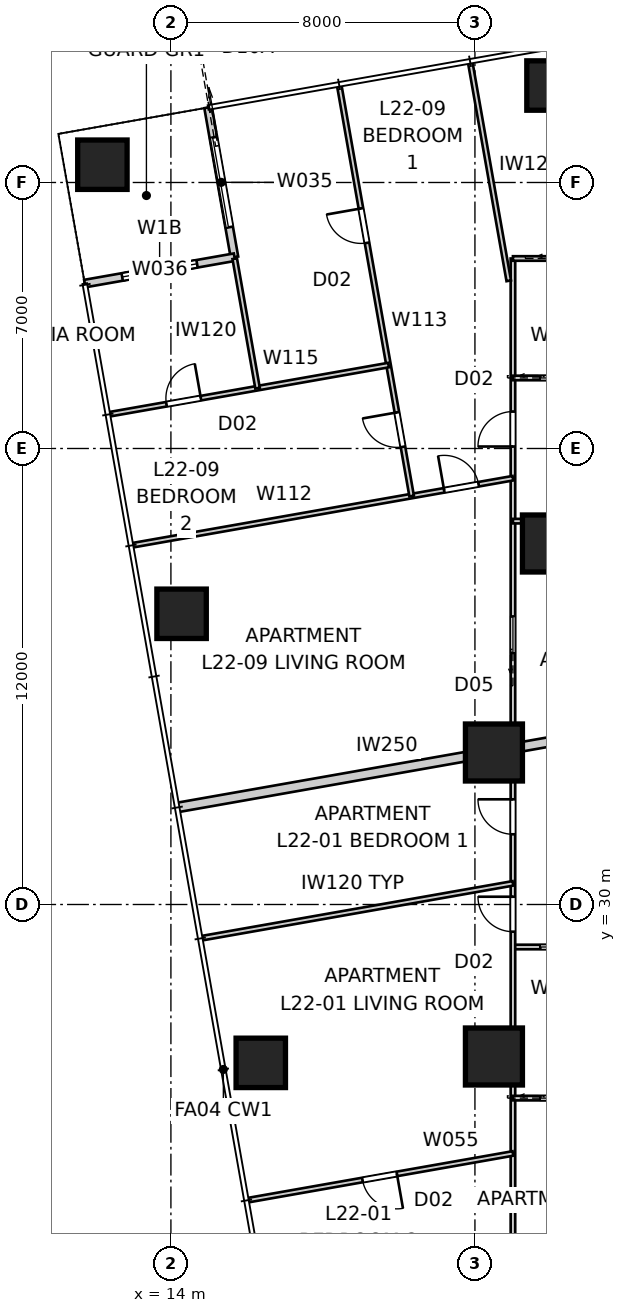
"""IFC4 building model, lengths in metres.
Left out: names, types, materials, properties, quantities, classifications, styles, units other than length and angle.
Written with IfcOpenShell. Run it as: python <this file> out.ifc"""

import sys

from ifc_helpers import new_model, si_unit, direction, frame, frame_2d, origin, origin_2d, place, context, subcontext, project, spatial, rectangle, extrude, element, fill, save


model = new_model("IFC4")
c1 = context("Model", 3, precision=1e-05, world=origin(), true_north=direction((0.0, 1.0)))
c2 = subcontext(c1, "Body", "Model", "MODEL_VIEW")
j1 = project(units=[si_unit("LENGTHUNIT", "METRE"), si_unit("PLANEANGLEUNIT", "RADIAN")], contexts=[c1])
p1 = place(None, origin())
s1 = spatial("IfcSite", under=j1, at=p1, CompositionType="ELEMENT")
p2 = place(p1, origin())
s2 = spatial("IfcBuilding", under=s1, at=p2, CompositionType="ELEMENT")
p3 = place(p2, frame((0.0, 0.0, 82.8)))
s3 = spatial("IfcBuildingStorey", under=s2, at=p3, CompositionType="ELEMENT", Elevation=82.8)
for number, where, z_axis, x_axis in (
    (1, (24.015, 51.552, 0.0), (0.0, 0.0, 1.0), (1.0, 0.0, 0.0)),
    (2, (12.197, 49.468, 0.0), (0.0, 0.0, 1.0), (1.0, 0.0, 0.0)),
    (3, (14.281, 37.65, 0.0), (0.0, 0.0, 1.0), (1.0, 0.0, 0.0)),
    (4, (16.365, 25.833, 0.0), (0.0, 0.0, 1.0), (1.0, 0.0, 0.0)),
):
    element("IfcColumn", number, at=place(p3, frame(where, z_axis=z_axis, x_axis=x_axis)), inside=s3, PredefinedType="COLUMN", context=c2, shape_type="SweptSolid", body=[
        extrude(rectangle(XDim=1.3, YDim=1.3, at=origin_2d()), origin(), (0.0, 0.0, 1.0), 3.4),
    ])
for number, where, z_axis, x_axis in (
    (5, (24.0, 39.5, 0.0), (0.0, 0.0, 1.0), (1.0, 0.0, 0.0)),
    (6, (22.5, 34.0, 0.0), (0.0, 0.0, 1.0), (1.0, 0.0, 0.0)),
    (7, (22.5, 26.0, 0.0), (0.0, 0.0, 1.0), (1.0, 0.0, 0.0)),
):
    element("IfcColumn", number, at=place(p3, frame(where, z_axis=z_axis, x_axis=x_axis)), inside=s3, PredefinedType="COLUMN", context=c2, shape_type="SweptSolid", body=[
        extrude(rectangle(XDim=1.5, YDim=1.5, at=origin_2d()), origin(), (0.0, 0.0, 1.0), 3.4),
    ])
p4 = place(p3, frame((14.978, 50.974, 0.0), z_axis=(0.0, 0.0, 1.0), x_axis=(0.173646056486, -0.984808127031, 0.0)))
e8 = element("IfcWall", 8, at=p4, inside=s3, PredefinedType="SOLIDWALL", context=c2, shape_type="SweptSolid", body=[
    extrude(rectangle(XDim=4.0, YDim=0.2, at=frame_2d((2.0, 0.0))), origin(), (0.0, 0.0, 1.0), 3.25),
])
p5 = place(p4, frame((0.8, 0.0, 0.0)))
e9 = element("IfcOpeningElement", 9, at=p5, cuts=e8, PredefinedType="OPENING", context=c2, shape_type="SweptSolid", body=[
    extrude(rectangle(XDim=2.4, YDim=2.1, at=frame_2d((1.2, 1.05))), frame((0.0, 0.11, 0.0), z_axis=(0.0, -1.0, 0.0), x_axis=(1.0, 0.0, 0.0)), (0.0, 0.0, 1.0), 0.22),
])
p6 = place(p3, frame((15.672, 47.034, 0.0), z_axis=(0.0, 0.0, 1.0), x_axis=(-0.984808127031, -0.173646056486, 0.0)))
e10 = element("IfcWall", 10, at=p6, inside=s3, PredefinedType="SOLIDWALL", context=c2, shape_type="SweptSolid", body=[
    extrude(rectangle(XDim=4.0, YDim=0.2, at=frame_2d((2.0, 0.0))), origin(), (0.0, 0.0, 1.0), 3.25),
])
p7 = place(p6, frame((1.0, 0.0, 0.45)))
e11 = element("IfcOpeningElement", 11, at=p7, cuts=e10, PredefinedType="OPENING", context=c2, shape_type="SweptSolid", body=[
    extrude(rectangle(XDim=2.0, YDim=1.8, at=frame_2d((1.0, 0.9))), frame((0.0, 0.11, 0.0), z_axis=(0.0, -1.0, 0.0), x_axis=(1.0, 0.0, 0.0)), (0.0, 0.0, 1.0), 0.22),
])
p8 = place(p3, frame((14.164, 32.552, 0.0), z_axis=(0.0, 0.0, 1.0), x_axis=(0.98481000304, 0.173635416642, 0.0)))
e12 = element("IfcWall", 12, at=p8, inside=s3, PredefinedType="PARTITIONING", context=c2, shape_type="SweptSolid", body=[
    extrude(rectangle(XDim=11.427, YDim=0.25, at=frame_2d((5.713, 0.0))), origin(), (0.0, 0.0, 1.0), 3.25),
])
p9 = place(p3, frame((25.4, 28.882, 0.0), z_axis=(0.0, 0.0, 1.0), x_axis=(-1.0, 0.0, 0.0)))
e13 = element("IfcWall", 13, at=p9, inside=s3, PredefinedType="PARTITIONING", context=c2, shape_type="SweptSolid", body=[
    extrude(rectangle(XDim=2.4, YDim=0.12, at=frame_2d((1.2, 0.0))), origin(), (0.0, 0.0, 1.0), 3.25),
])
p10 = place(p9, frame((0.72, 0.0, 0.0)))
e14 = element("IfcOpeningElement", 14, at=p10, cuts=e13, PredefinedType="OPENING", context=c2, shape_type="SweptSolid", body=[
    extrude(rectangle(XDim=0.96, YDim=2.1, at=frame_2d((0.48, 1.05))), frame((0.0, 0.07, 0.0), z_axis=(0.0, -1.0, 0.0), x_axis=(1.0, 0.0, 0.0)), (0.0, 0.0, 1.0), 0.14),
])
p11 = place(p3, frame((23.0, 13.0, 0.0), z_axis=(0.0, 0.0, 1.0), x_axis=(0.0, 1.0, 0.0)))
e15 = element("IfcWall", 15, at=p11, inside=s3, PredefinedType="PARTITIONING", context=c2, shape_type="SweptSolid", body=[
    extrude(rectangle(XDim=34.0, YDim=0.12, at=frame_2d((17.0, 0.0))), origin(), (0.0, 0.0, 1.0), 2.55),
])
p12 = place(p11, frame((18.848, 0.0, 0.0)))
e16 = element("IfcOpeningElement", 16, at=p12, cuts=e15, PredefinedType="OPENING", context=c2, shape_type="SweptSolid", body=[
    extrude(rectangle(XDim=0.92, YDim=2.34, at=frame_2d((0.46, 1.17))), frame((0.0, 0.07, 0.0), z_axis=(0.0, -1.0, 0.0), x_axis=(1.0, 0.0, 0.0)), (0.0, 0.0, 1.0), 0.14),
])
p13 = place(p11, frame((16.284, 0.0, 0.0)))
e17 = element("IfcOpeningElement", 17, at=p13, cuts=e15, PredefinedType="OPENING", context=c2, shape_type="SweptSolid", body=[
    extrude(rectangle(XDim=0.92, YDim=2.34, at=frame_2d((0.46, 1.17))), frame((0.0, 0.07, 0.0), z_axis=(0.0, -1.0, 0.0), x_axis=(1.0, 0.0, 0.0)), (0.0, 0.0, 1.0), 0.14),
])
p14 = place(p11, frame((29.052, 0.0, 0.0)))
e18 = element("IfcOpeningElement", 18, at=p14, cuts=e15, PredefinedType="OPENING", context=c2, shape_type="SweptSolid", body=[
    extrude(rectangle(XDim=0.92, YDim=2.34, at=frame_2d((0.46, 1.17))), frame((0.0, 0.07, 0.0), z_axis=(0.0, -1.0, 0.0), x_axis=(1.0, 0.0, 0.0)), (0.0, 0.0, 1.0), 0.14),
])
p15 = place(p11, frame((1.196, 0.0, 0.0)))
e19 = element("IfcOpeningElement", 19, at=p15, cuts=e15, PredefinedType="OPENING", context=c2, shape_type="SweptSolid", body=[
    extrude(rectangle(XDim=0.92, YDim=2.34, at=frame_2d((0.46, 1.17))), frame((0.0, 0.07, 0.0), z_axis=(0.0, -1.0, 0.0), x_axis=(1.0, 0.0, 0.0)), (0.0, 0.0, 1.0), 0.14),
])
p16 = place(p11, frame((3.633, 0.0, 0.0)))
e20 = element("IfcOpeningElement", 20, at=p16, cuts=e15, PredefinedType="OPENING", context=c2, shape_type="SweptSolid", body=[
    extrude(rectangle(XDim=0.92, YDim=2.34, at=frame_2d((0.46, 1.17))), frame((0.0, 0.07, 0.0), z_axis=(0.0, -1.0, 0.0), x_axis=(1.0, 0.0, 0.0)), (0.0, 0.0, 1.0), 0.14),
])
p17 = place(p11, frame((23.619, 0.0, 0.0)))
e21 = element("IfcOpeningElement", 21, at=p17, cuts=e15, PredefinedType="OPENING", context=c2, shape_type="SweptSolid", body=[
    extrude(rectangle(XDim=0.96, YDim=2.1, at=frame_2d((0.48, 1.05))), frame((0.0, 0.07, 0.0), z_axis=(0.0, -1.0, 0.0), x_axis=(1.0, 0.0, 0.0)), (0.0, 0.0, 1.0), 0.14),
])
p18 = place(p3, frame((23.0, 24.905, 0.0), z_axis=(0.0, 0.0, 1.0), x_axis=(1.0, 0.0, 0.0)))
e22 = element("IfcWall", 22, at=p18, inside=s3, PredefinedType="PARTITIONING", context=c2, shape_type="SweptSolid", body=[
    extrude(rectangle(XDim=2.4, YDim=0.12, at=frame_2d((1.2, 0.0))), origin(), (0.0, 0.0, 1.0), 3.25),
])
p19 = place(p18, frame((0.72, 0.0, 0.0)))
e23 = element("IfcOpeningElement", 23, at=p19, cuts=e22, PredefinedType="OPENING", context=c2, shape_type="SweptSolid", body=[
    extrude(rectangle(XDim=0.96, YDim=2.1, at=frame_2d((0.48, 1.05))), frame((0.0, 0.07, 0.0), z_axis=(0.0, -1.0, 0.0), x_axis=(1.0, 0.0, 0.0)), (0.0, 0.0, 1.0), 0.14),
])
p20 = place(p3, frame((14.812, 29.113, 0.0), z_axis=(0.0, 0.0, 1.0), x_axis=(0.984807787824, 0.173647980238, 0.0)))
e24 = element("IfcWall", 24, at=p20, inside=s3, PredefinedType="PARTITIONING", context=c2, shape_type="SweptSolid", body=[
    extrude(rectangle(XDim=8.315, YDim=0.12, at=frame_2d((4.157, 0.0))), origin(), (0.0, 0.0, 1.0), 3.25),
])
p21 = place(p3, frame((23.0, 23.448, 0.0), z_axis=(0.0, 0.0, 1.0), x_axis=(-0.984809234282, -0.173639776761, 0.0)))
e25 = element("IfcWall", 25, at=p21, inside=s3, PredefinedType="PARTITIONING", context=c2, shape_type="SweptSolid", body=[
    extrude(rectangle(XDim=7.081, YDim=0.12, at=frame_2d((3.541, 0.0))), origin(), (0.0, 0.0, 1.0), 3.25),
])
p22 = place(p21, frame((3.1, 0.0, 0.0)))
e26 = element("IfcOpeningElement", 26, at=p22, cuts=e25, PredefinedType="OPENING", context=c2, shape_type="SweptSolid", body=[
    extrude(rectangle(XDim=0.92, YDim=2.34, at=frame_2d((0.46, 1.17))), frame((0.0, 0.07, 0.0), z_axis=(0.0, -1.0, 0.0), x_axis=(1.0, 0.0, 0.0)), (0.0, 0.0, 1.0), 0.14),
])
p23 = place(p3, frame((23.0, 47.0, 0.0), z_axis=(0.0, 0.0, 1.0), x_axis=(1.0, 0.0, 0.0)))
e27 = element("IfcWall", 27, at=p23, inside=s3, PredefinedType="PARTITIONING", context=c2, shape_type="SweptSolid", body=[
    extrude(rectangle(XDim=24.771, YDim=0.12, at=frame_2d((12.386, 0.0))), origin(), (0.0, 0.0, 1.0), 2.55),
])
p24 = place(p23, frame((21.825, 0.0, 0.0)))
e28 = element("IfcOpeningElement", 28, at=p24, cuts=e27, PredefinedType="OPENING", context=c2, shape_type="SweptSolid", body=[
    extrude(rectangle(XDim=0.92, YDim=2.34, at=frame_2d((0.46, 1.17))), frame((0.0, 0.07, 0.0), z_axis=(0.0, -1.0, 0.0), x_axis=(1.0, 0.0, 0.0)), (0.0, 0.0, 1.0), 0.14),
])
p25 = place(p23, frame((11.135, 0.0, 0.0)))
e29 = element("IfcOpeningElement", 29, at=p25, cuts=e27, PredefinedType="OPENING", context=c2, shape_type="SweptSolid", body=[
    extrude(rectangle(XDim=0.96, YDim=2.1, at=frame_2d((0.48, 1.05))), frame((0.0, 0.07, 0.0), z_axis=(0.0, -1.0, 0.0), x_axis=(1.0, 0.0, 0.0)), (0.0, 0.0, 1.0), 0.14),
])
p26 = place(p23, frame((1.19, 0.0, 0.0)))
e30 = element("IfcOpeningElement", 30, at=p26, cuts=e27, PredefinedType="OPENING", context=c2, shape_type="SweptSolid", body=[
    extrude(rectangle(XDim=0.96, YDim=2.1, at=frame_2d((0.48, 1.05))), frame((0.0, 0.07, 0.0), z_axis=(0.0, -1.0, 0.0), x_axis=(1.0, 0.0, 0.0)), (0.0, 0.0, 1.0), 0.14),
])
p27 = place(p23, frame((8.342, 0.0, 0.0)))
e31 = element("IfcOpeningElement", 31, at=p27, cuts=e27, PredefinedType="OPENING", context=c2, shape_type="SweptSolid", body=[
    extrude(rectangle(XDim=0.96, YDim=2.1, at=frame_2d((0.48, 1.05))), frame((0.0, 0.07, 0.0), z_axis=(0.0, -1.0, 0.0), x_axis=(1.0, 0.0, 0.0)), (0.0, 0.0, 1.0), 0.14),
])
p28 = place(p23, frame((4.663, 0.0, 0.0)))
e32 = element("IfcOpeningElement", 32, at=p28, cuts=e27, PredefinedType="OPENING", context=c2, shape_type="SweptSolid", body=[
    extrude(rectangle(XDim=0.96, YDim=2.1, at=frame_2d((0.48, 1.05))), frame((0.0, 0.07, 0.0), z_axis=(0.0, -1.0, 0.0), x_axis=(1.0, 0.0, 0.0)), (0.0, 0.0, 1.0), 0.14),
])
p29 = place(p3, frame((25.4, 40.088, 0.0), z_axis=(0.0, 0.0, 1.0), x_axis=(-1.0, 0.0, 0.0)))
e33 = element("IfcWall", 33, at=p29, inside=s3, PredefinedType="PARTITIONING", context=c2, shape_type="SweptSolid", body=[
    extrude(rectangle(XDim=2.4, YDim=0.12, at=frame_2d((1.2, 0.0))), origin(), (0.0, 0.0, 1.0), 3.25),
])
p30 = place(p3, frame((23.0, 43.856, 0.0), z_axis=(0.0, 0.0, 1.0), x_axis=(1.0, 0.0, 0.0)))
e34 = element("IfcWall", 34, at=p30, inside=s3, PredefinedType="PARTITIONING", context=c2, shape_type="SweptSolid", body=[
    extrude(rectangle(XDim=2.4, YDim=0.12, at=frame_2d((1.2, 0.0))), origin(), (0.0, 0.0, 1.0), 3.25),
])
p31 = place(p30, frame((0.72, 0.0, 0.0)))
e35 = element("IfcOpeningElement", 35, at=p31, cuts=e34, PredefinedType="OPENING", context=c2, shape_type="SweptSolid", body=[
    extrude(rectangle(XDim=0.96, YDim=2.1, at=frame_2d((0.48, 1.05))), frame((0.0, 0.07, 0.0), z_axis=(0.0, -1.0, 0.0), x_axis=(1.0, 0.0, 0.0)), (0.0, 0.0, 1.0), 0.14),
])
p32 = place(p3, frame((12.988, 39.453, 0.0), z_axis=(0.0, 0.0, 1.0), x_axis=(0.984807724889, 0.173648337162, 0.0)))
e36 = element("IfcWall", 36, at=p32, inside=s3, PredefinedType="PARTITIONING", context=c2, shape_type="SweptSolid", body=[
    extrude(rectangle(XDim=10.167, YDim=0.12, at=frame_2d((5.083, 0.0))), origin(), (0.0, 0.0, 1.0), 2.638),
])
p33 = place(p32, frame((8.328, 0.0, 0.0)))
e37 = element("IfcOpeningElement", 37, at=p33, cuts=e36, PredefinedType="OPENING", context=c2, shape_type="SweptSolid", body=[
    extrude(rectangle(XDim=0.92, YDim=2.34, at=frame_2d((0.46, 1.17))), frame((0.0, 0.07, 0.0), z_axis=(0.0, -1.0, 0.0), x_axis=(1.0, 0.0, 0.0)), (0.0, 0.0, 1.0), 0.14),
])
p34 = place(p3, frame((20.335, 40.749, 0.0), z_axis=(0.0, 0.0, 1.0), x_axis=(-0.173639194339, 0.984809336973, 0.0)))
e38 = element("IfcWall", 38, at=p34, inside=s3, PredefinedType="PARTITIONING", context=c2, shape_type="SweptSolid", body=[
    extrude(rectangle(XDim=10.96, YDim=0.12, at=frame_2d((5.48, 0.0))), origin(), (0.0, 0.0, 1.0), 3.25),
])
p35 = place(p34, frame((6.765, 0.0, 0.0)))
e39 = element("IfcOpeningElement", 39, at=p35, cuts=e38, PredefinedType="OPENING", context=c2, shape_type="SweptSolid", body=[
    extrude(rectangle(XDim=0.92, YDim=2.34, at=frame_2d((0.46, 1.17))), frame((0.0, 0.07, 0.0), z_axis=(0.0, -1.0, 0.0), x_axis=(1.0, 0.0, 0.0)), (0.0, 0.0, 1.0), 0.14),
])
p36 = place(p34, frame((1.315, 0.0, 0.0)))
e40 = element("IfcOpeningElement", 40, at=p36, cuts=e38, PredefinedType="OPENING", context=c2, shape_type="SweptSolid", body=[
    extrude(rectangle(XDim=0.92, YDim=2.34, at=frame_2d((0.46, 1.17))), frame((0.0, 0.07, 0.0), z_axis=(0.0, -1.0, 0.0), x_axis=(1.0, 0.0, 0.0)), (0.0, 0.0, 1.0), 0.14),
])
p37 = place(p3, frame((21.878, 52.15, 0.0), z_axis=(0.0, 0.0, 1.0), x_axis=(0.173634707655, -0.984810128044, 0.0)))
e41 = element("IfcWall", 41, at=p37, inside=s3, PredefinedType="PARTITIONING", context=c2, shape_type="SweptSolid", body=[
    extrude(rectangle(XDim=5.825, YDim=0.12, at=frame_2d((2.913, 0.0))), origin(), (0.0, 0.0, 1.0), 2.638),
])
p38 = place(p3, frame((12.38, 42.9, 0.0), z_axis=(0.0, 0.0, 1.0), x_axis=(0.984807929323, 0.173647177755, 0.0)))
e42 = element("IfcWall", 42, at=p38, inside=s3, PredefinedType="PARTITIONING", context=c2, shape_type="SweptSolid", body=[
    extrude(rectangle(XDim=7.46, YDim=0.12, at=frame_2d((3.73, 0.0))), origin(), (0.0, 0.0, 1.0), 3.25),
])
p39 = place(p38, frame((1.525, 0.0, 0.0)))
e43 = element("IfcOpeningElement", 43, at=p39, cuts=e42, PredefinedType="OPENING", context=c2, shape_type="SweptSolid", body=[
    extrude(rectangle(XDim=0.92, YDim=2.34, at=frame_2d((0.46, 1.17))), frame((0.0, 0.07, 0.0), z_axis=(0.0, -1.0, 0.0), x_axis=(1.0, 0.0, 0.0)), (0.0, 0.0, 1.0), 0.14),
])
p40 = place(p3, frame((16.28, 43.588, 0.0), z_axis=(0.0, 0.0, 1.0), x_axis=(-0.173660541335, 0.984805572884, 0.0)))
e44 = element("IfcWall", 44, at=p40, inside=s3, PredefinedType="PARTITIONING", context=c2, shape_type="SweptSolid", body=[
    extrude(rectangle(XDim=3.46, YDim=0.12, at=frame_2d((1.73, 0.0))), origin(), (0.0, 0.0, 1.0), 3.25),
])
p41 = place(p5, origin())
e45 = element("IfcDoor", 45, at=p41, inside=s3, OperationType="SLIDING_TO_LEFT", PredefinedType="DOOR", context=c2, shape_type="SweptSolid", body=[
    extrude(rectangle(XDim=2.4, YDim=2.1, at=frame_2d((1.2, 1.05))), frame((0.0, 0.025, 0.0), z_axis=(0.0, -1.0, 0.0), x_axis=(1.0, 0.0, 0.0)), (0.0, 0.0, 1.0), 0.05),
])
fill(e9, e45)
p42 = place(p7, origin())
e46 = element("IfcWindow", 46, at=p42, inside=s3, PartitioningType="SINGLE_PANEL", PredefinedType="WINDOW", context=c2, shape_type="SweptSolid", body=[
    extrude(rectangle(XDim=2.0, YDim=1.8, at=frame_2d((1.0, 0.9))), frame((0.0, 0.03, 0.0), z_axis=(0.0, -1.0, 0.0), x_axis=(1.0, 0.0, 0.0)), (0.0, 0.0, 1.0), 0.06),
])
fill(e11, e46)
p43 = place(p12, origin())
e47 = element("IfcDoor", 47, at=p43, inside=s3, OperationType="SINGLE_SWING_RIGHT", PredefinedType="DOOR", context=c2, shape_type="SweptSolid", body=[
    extrude(rectangle(XDim=0.92, YDim=2.34, at=frame_2d((0.46, 1.17))), frame((0.0, 0.025, 0.0), z_axis=(0.0, -1.0, 0.0), x_axis=(1.0, 0.0, 0.0)), (0.0, 0.0, 1.0), 0.05),
])
fill(e16, e47)
p44 = place(p10, origin())
e48 = element("IfcDoor", 48, at=p44, inside=s3, OperationType="SLIDING_TO_LEFT", PredefinedType="DOOR", context=c2, shape_type="SweptSolid", body=[
    extrude(rectangle(XDim=0.96, YDim=2.1, at=frame_2d((0.48, 1.05))), frame((0.0, 0.025, 0.0), z_axis=(0.0, -1.0, 0.0), x_axis=(1.0, 0.0, 0.0)), (0.0, 0.0, 1.0), 0.05),
])
fill(e14, e48)
p45 = place(p13, origin())
e49 = element("IfcDoor", 49, at=p45, inside=s3, OperationType="SINGLE_SWING_RIGHT", PredefinedType="DOOR", context=c2, shape_type="SweptSolid", body=[
    extrude(rectangle(XDim=0.92, YDim=2.34, at=frame_2d((0.46, 1.17))), frame((0.0, 0.025, 0.0), z_axis=(0.0, -1.0, 0.0), x_axis=(1.0, 0.0, 0.0)), (0.0, 0.0, 1.0), 0.05),
])
fill(e17, e49)
p46 = place(p14, origin())
e50 = element("IfcDoor", 50, at=p46, inside=s3, OperationType="SINGLE_SWING_LEFT", PredefinedType="DOOR", context=c2, shape_type="SweptSolid", body=[
    extrude(rectangle(XDim=0.92, YDim=2.34, at=frame_2d((0.46, 1.17))), frame((0.0, 0.025, 0.0), z_axis=(0.0, -1.0, 0.0), x_axis=(1.0, 0.0, 0.0)), (0.0, 0.0, 1.0), 0.05),
])
fill(e18, e50)
p47 = place(p31, origin())
e51 = element("IfcDoor", 51, at=p47, inside=s3, OperationType="SLIDING_TO_LEFT", PredefinedType="DOOR", context=c2, shape_type="SweptSolid", body=[
    extrude(rectangle(XDim=0.96, YDim=2.1, at=frame_2d((0.48, 1.05))), frame((0.0, 0.025, 0.0), z_axis=(0.0, -1.0, 0.0), x_axis=(1.0, 0.0, 0.0)), (0.0, 0.0, 1.0), 0.05),
])
fill(e35, e51)
p48 = place(p19, origin())
e52 = element("IfcDoor", 52, at=p48, inside=s3, OperationType="SLIDING_TO_LEFT", PredefinedType="DOOR", context=c2, shape_type="SweptSolid", body=[
    extrude(rectangle(XDim=0.96, YDim=2.1, at=frame_2d((0.48, 1.05))), frame((0.0, 0.025, 0.0), z_axis=(0.0, -1.0, 0.0), x_axis=(1.0, 0.0, 0.0)), (0.0, 0.0, 1.0), 0.05),
])
fill(e23, e52)
p49 = place(p22, origin())
e53 = element("IfcDoor", 53, at=p49, inside=s3, OperationType="SINGLE_SWING_LEFT", PredefinedType="DOOR", context=c2, shape_type="SweptSolid", body=[
    extrude(rectangle(XDim=0.92, YDim=2.34, at=frame_2d((0.46, 1.17))), frame((0.0, 0.025, 0.0), z_axis=(0.0, -1.0, 0.0), x_axis=(1.0, 0.0, 0.0)), (0.0, 0.0, 1.0), 0.05),
])
fill(e26, e53)
p50 = place(p35, origin())
e54 = element("IfcDoor", 54, at=p50, inside=s3, OperationType="SINGLE_SWING_RIGHT", PredefinedType="DOOR", context=c2, shape_type="SweptSolid", body=[
    extrude(rectangle(XDim=0.92, YDim=2.34, at=frame_2d((0.46, 1.17))), frame((0.0, 0.025, 0.0), z_axis=(0.0, -1.0, 0.0), x_axis=(1.0, 0.0, 0.0)), (0.0, 0.0, 1.0), 0.05),
])
fill(e39, e54)
p51 = place(p36, origin())
e55 = element("IfcDoor", 55, at=p51, inside=s3, OperationType="SINGLE_SWING_RIGHT", PredefinedType="DOOR", context=c2, shape_type="SweptSolid", body=[
    extrude(rectangle(XDim=0.92, YDim=2.34, at=frame_2d((0.46, 1.17))), frame((0.0, 0.025, 0.0), z_axis=(0.0, -1.0, 0.0), x_axis=(1.0, 0.0, 0.0)), (0.0, 0.0, 1.0), 0.05),
])
fill(e40, e55)
p52 = place(p33, origin())
e56 = element("IfcDoor", 56, at=p52, inside=s3, OperationType="SINGLE_SWING_LEFT", PredefinedType="DOOR", context=c2, shape_type="SweptSolid", body=[
    extrude(rectangle(XDim=0.92, YDim=2.34, at=frame_2d((0.46, 1.17))), frame((0.0, 0.025, 0.0), z_axis=(0.0, -1.0, 0.0), x_axis=(1.0, 0.0, 0.0)), (0.0, 0.0, 1.0), 0.05),
])
fill(e37, e56)
p53 = place(p17, origin())
e57 = element("IfcDoor", 57, at=p53, inside=s3, OperationType="SLIDING_TO_LEFT", PredefinedType="DOOR", context=c2, shape_type="SweptSolid", body=[
    extrude(rectangle(XDim=0.96, YDim=2.1, at=frame_2d((0.48, 1.05))), frame((0.0, 0.025, 0.0), z_axis=(0.0, -1.0, 0.0), x_axis=(1.0, 0.0, 0.0)), (0.0, 0.0, 1.0), 0.05),
])
fill(e21, e57)
p54 = place(p39, origin())
e58 = element("IfcDoor", 58, at=p54, inside=s3, OperationType="SINGLE_SWING_RIGHT", PredefinedType="DOOR", context=c2, shape_type="SweptSolid", body=[
    extrude(rectangle(XDim=0.92, YDim=2.34, at=frame_2d((0.46, 1.17))), frame((0.0, 0.025, 0.0), z_axis=(0.0, -1.0, 0.0), x_axis=(1.0, 0.0, 0.0)), (0.0, 0.0, 1.0), 0.05),
])
fill(e43, e58)
save(model, sys.argv[1])
